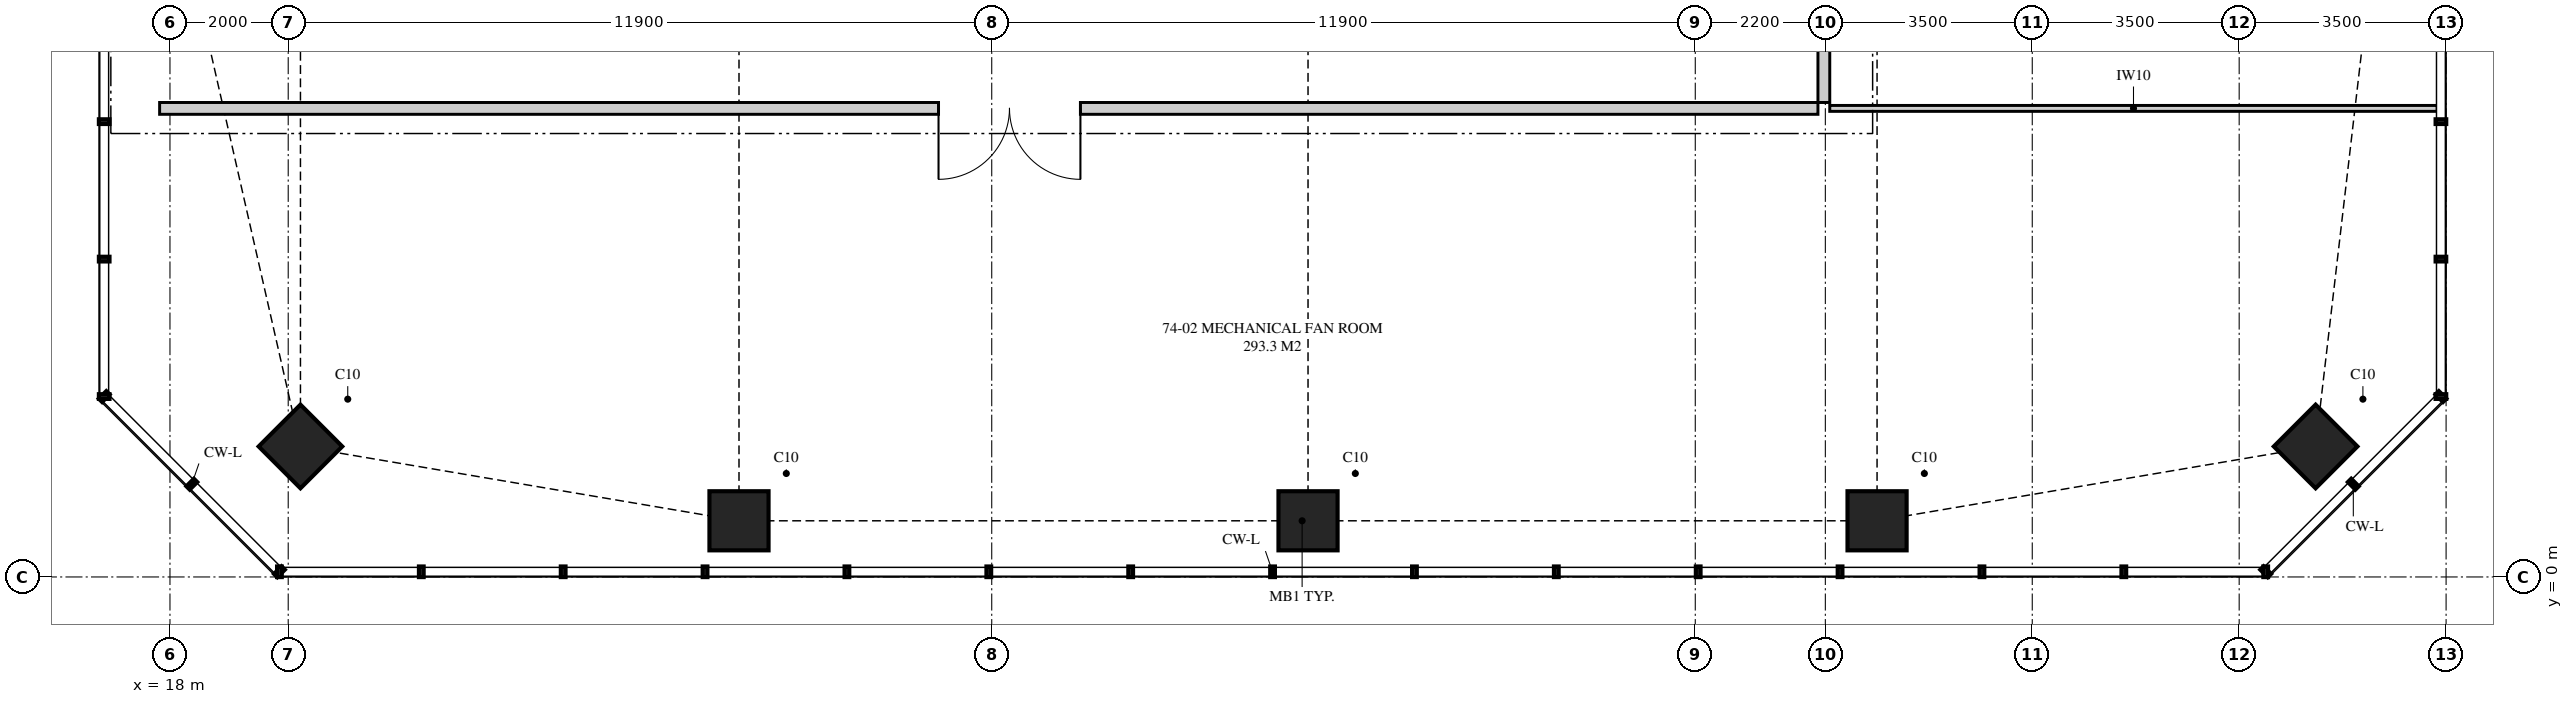
"""IFC4 building model, lengths in metres.
Left out: names, types, materials, properties, quantities, classifications, styles, units other than length and angle.
Written with IfcOpenShell. Run it as: python <this file> out.ifc"""

import sys

from ifc_helpers import new_model, si_unit, direction, frame, frame_2d, origin, origin_2d, place, context, subcontext, project, spatial, polyline, rectangle, outline, extrude, element, fill, save


model = new_model("IFC4")
c1 = context("Model", 3, precision=1e-05, world=origin(), true_north=direction((0.0, 1.0)))
c2 = subcontext(c1, "Body", "Model", "MODEL_VIEW")
j1 = project(units=[si_unit("LENGTHUNIT", "METRE"), si_unit("PLANEANGLEUNIT", "RADIAN")], contexts=[c1])
p1 = place(None, origin())
s1 = spatial("IfcSite", under=j1, at=p1, CompositionType="ELEMENT")
p2 = place(p1, origin())
s2 = spatial("IfcBuilding", under=s1, at=p2, CompositionType="ELEMENT")
p3 = place(p2, frame((0.0, 0.0, 272.75)))
s3 = spatial("IfcBuildingStorey", under=s2, at=p3, CompositionType="ELEMENT", Elevation=272.75)
for number, where, z_axis, x_axis in (
    (1, (20.207, 2.207, 0.0), (0.0, 0.0, 1.0), (0.707, 0.707, 0.0)),
    (2, (27.625, 0.95, 0.0), (0.0, 0.0, 1.0), (1.0, 0.0, 0.0)),
    (3, (37.25, 0.95, 0.0), (0.0, 0.0, 1.0), (1.0, 0.0, 0.0)),
    (4, (46.875, 0.95, 0.0), (0.0, 0.0, 1.0), (1.0, 0.0, 0.0)),
    (5, (54.293, 2.207, 0.0), (0.0, 0.0, 1.0), (0.707, 0.707, 0.0)),
):
    element("IfcColumn", number, at=place(p3, frame(where, z_axis=z_axis, x_axis=x_axis)), inside=s3, PredefinedType="COLUMN", context=c2, shape_type="SweptSolid", body=[
        extrude(rectangle(XDim=1.0, YDim=1.0, at=origin_2d()), origin(), (0.0, 0.0, 1.0), 5.0),
    ])
p4 = place(p3, frame((17.825, 7.925, 0.0), z_axis=(0.0, 0.0, 1.0), x_axis=(1.0, 0.0, 0.0)))
e6 = element("IfcWall", 6, at=p4, inside=s3, PredefinedType="PARTITIONING", context=c2, shape_type="SweptSolid", body=[
    extrude(outline(polyline([(0.0, 0.0), (28.05, 0.0), (28.05, 4.72), (28.05, 4.12), (27.74, 4.12), (27.74, 4.72), (20.735, 4.72), (20.735, 4.12), (18.115, 4.12), (18.115, 4.72), (11.11, 4.72), (11.11, 4.12), (8.49, 4.12), (8.49, 4.72), (3.692, 4.72), (3.692, 4.12), (2.014, 4.12), (2.014, 3.5), (0.147, 3.5), (0.147, 4.72), (0.0, 4.72), (0.0, 0.0)])), frame((0.0, 0.1, 0.0), z_axis=(0.0, -1.0, 0.0), x_axis=(1.0, 0.0, 0.0)), (0.0, 0.0, 1.0), 0.2),
])
p5 = place(p4, frame((13.175, 0.0, 0.0)))
e7 = element("IfcOpeningElement", 7, at=p5, cuts=e6, PredefinedType="OPENING", context=c2, shape_type="SweptSolid", body=[
    extrude(rectangle(XDim=2.4, YDim=2.4, at=frame_2d((1.2, 1.2))), frame((0.0, 0.11, 0.0), z_axis=(0.0, -1.0, 0.0), x_axis=(1.0, 0.0, 0.0)), (0.0, 0.0, 1.0), 0.22),
])
p6 = place(p3, frame((45.975, 8.025, 0.0), z_axis=(0.0, 0.0, 1.0), x_axis=(0.0, 1.0, 0.0)))
e8 = element("IfcWall", 8, at=p6, inside=s3, PredefinedType="PARTITIONING", context=c2, shape_type="SweptSolid", body=[
    extrude(outline(polyline([(0.0, 0.0), (1.8, 0.0), (1.8, 4.72), (1.8, 4.12), (0.0, 4.12), (0.0, 4.72), (0.0, 0.0)])), frame((0.0, 0.1, 0.0), z_axis=(0.0, -1.0, 0.0), x_axis=(1.0, 0.0, 0.0)), (0.0, 0.0, 1.0), 0.2),
])
p7 = place(p3, frame((46.075, 7.925, 0.0), z_axis=(0.0, 0.0, 1.0), x_axis=(1.0, 0.0, 0.0)))
e9 = element("IfcWall", 9, at=p7, inside=s3, PredefinedType="PARTITIONING", context=c2, shape_type="SweptSolid", body=[
    extrude(outline(polyline([(0.0, 0.0), (10.275, 0.0), (10.275, 4.72), (9.75, 4.72), (9.75, 3.5), (8.018, 3.5), (8.018, 4.72), (2.06, 4.72), (2.06, 4.12), (0.0, 4.12), (0.0, 4.72), (0.0, 0.0)])), frame((0.0, 0.05, 0.0), z_axis=(0.0, -1.0, 0.0), x_axis=(1.0, 0.0, 0.0)), (0.0, 0.0, 1.0), 0.1),
])
p8 = place(p5, frame((2.4, 0.0, 0.0), z_axis=(0.0, 0.0, 1.0), x_axis=(-1.0, 0.0, 0.0)))
e10 = element("IfcDoor", 10, at=p8, inside=s3, OperationType="DOUBLE_DOOR_SINGLE_SWING", PredefinedType="DOOR", context=c2, shape_type="SweptSolid", body=[
    extrude(rectangle(XDim=2.4, YDim=2.4, at=frame_2d((1.2, 1.2))), frame((0.0, 0.025, 0.0), z_axis=(0.0, -1.0, 0.0), x_axis=(1.0, 0.0, 0.0)), (0.0, 0.0, 1.0), 0.05),
])
fill(e7, e10)
save(model, sys.argv[1])
